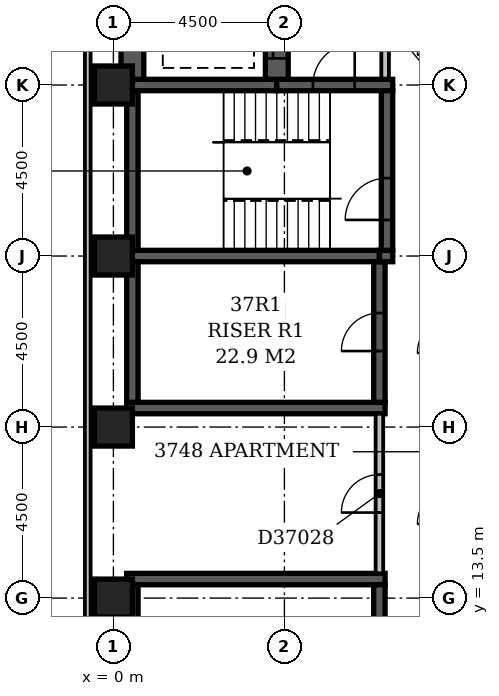
"""IFC4 building model, lengths in metres.
Left out: names, types, materials, properties, quantities, classifications, styles, units other than length and angle.
Written with IfcOpenShell. Run it as: python <this file> out.ifc"""

import sys

from ifc_helpers import new_model, si_unit, direction, frame, frame_2d, origin, origin_2d, place, context, subcontext, project, spatial, rectangle, extrude, element, fill, save


model = new_model("IFC4")
c1 = context("Model", 3, precision=1e-05, world=origin(), true_north=direction((0.0, 1.0)))
c2 = subcontext(c1, "Body", "Model", "MODEL_VIEW")
j1 = project(units=[si_unit("LENGTHUNIT", "METRE"), si_unit("PLANEANGLEUNIT", "RADIAN")], contexts=[c1])
p1 = place(None, origin())
s1 = spatial("IfcSite", under=j1, at=p1, CompositionType="ELEMENT")
p2 = place(p1, origin())
s2 = spatial("IfcBuilding", under=s1, at=p2, CompositionType="ELEMENT")
p3 = place(p2, frame((0.0, 0.0, 148.4)))
s3 = spatial("IfcBuildingStorey", under=s2, at=p3, CompositionType="ELEMENT", Elevation=148.4)
for number, where, z_axis, x_axis in (
    (1, (0.35, 14.0, -0.3), (0.0, 0.0, 1.0), (1.0, 0.0, 0.0)),
    (2, (0.35, 18.5, -0.3), (0.0, 0.0, 1.0), (1.0, 0.0, 0.0)),
):
    element("IfcWall", number, at=place(p3, frame(where, z_axis=z_axis, x_axis=x_axis)), inside=s3, PredefinedType="SHEAR", context=c2, shape_type="SweptSolid", body=[
        extrude(rectangle(XDim=6.8, YDim=0.3, at=frame_2d((3.4, 0.0))), origin(), (0.0, 0.0, 1.0), 3.6),
    ])
p4 = place(p3, frame((0.35, 22.5, -0.3), z_axis=(0.0, 0.0, 1.0), x_axis=(1.0, 0.0, 0.0)))
e3 = element("IfcWall", 3, at=p4, inside=s3, PredefinedType="SHEAR", context=c2, shape_type="SweptSolid", body=[
    extrude(rectangle(XDim=6.65, YDim=0.3, at=frame_2d((3.325, 0.0))), origin(), (0.0, 0.0, 1.0), 3.6),
])
p5 = place(p3, frame((0.35, 27.0, -0.3), z_axis=(0.0, 0.0, 1.0), x_axis=(1.0, 0.0, 0.0)))
e4 = element("IfcWall", 4, at=p5, inside=s3, PredefinedType="SHEAR", context=c2, shape_type="SweptSolid", body=[
    extrude(rectangle(XDim=3.95, YDim=0.3, at=frame_2d((1.975, 0.0))), origin(), (0.0, 0.0, 1.0), 3.6),
])
for number, where, z_axis, x_axis in (
    (5, (0.5, 10.15, -0.3), (0.0, 0.0, 1.0), (0.0, 1.0, 0.0)),
    (6, (0.5, 18.65, -0.3), (0.0, 0.0, 1.0), (0.0, 1.0, 0.0)),
):
    element("IfcWall", number, at=place(p3, frame(where, z_axis=z_axis, x_axis=x_axis)), inside=s3, PredefinedType="SHEAR", context=c2, shape_type="SweptSolid", body=[
        extrude(rectangle(XDim=3.7, YDim=0.3, at=frame_2d((1.85, 0.0))), origin(), (0.0, 0.0, 1.0), 3.6),
    ])
p6 = place(p3, frame((0.5, 22.65, -0.3), z_axis=(0.0, 0.0, 1.0), x_axis=(0.0, 1.0, 0.0)))
e7 = element("IfcWall", 7, at=p6, inside=s3, PredefinedType="SHEAR", context=c2, shape_type="SweptSolid", body=[
    extrude(rectangle(XDim=4.2, YDim=0.3, at=frame_2d((2.1, 0.0))), origin(), (0.0, 0.0, 1.0), 3.6),
])
p7 = place(p3, frame((0.5, 27.15, -0.3), z_axis=(0.0, 0.0, 1.0), x_axis=(0.0, 1.0, 0.0)))
e8 = element("IfcWall", 8, at=p7, inside=s3, PredefinedType="SHEAR", context=c2, shape_type="SweptSolid", body=[
    extrude(rectangle(XDim=22.05, YDim=0.6, at=frame_2d((11.025, 0.0))), origin(), (0.0, 0.0, 1.0), 3.6),
])
p8 = place(p3, frame((4.3, 27.0, -0.3), z_axis=(0.0, 0.0, 1.0), x_axis=(1.0, 0.0, 0.0)))
e9 = element("IfcWall", 9, at=p8, inside=s3, PredefinedType="SHEAR", context=c2, shape_type="SweptSolid", body=[
    extrude(rectangle(XDim=3.05, YDim=0.3, at=frame_2d((1.525, 0.0))), origin(), (0.0, 0.0, 1.0), 3.6),
])
p9 = place(p8, frame((0.95, 0.0, 0.3)))
e10 = element("IfcOpeningElement", 10, at=p9, cuts=e9, PredefinedType="OPENING", context=c2, shape_type="SweptSolid", body=[
    extrude(rectangle(XDim=1.1, YDim=2.1, at=frame_2d((0.55, 1.05))), frame((0.0, 0.162, 0.0), z_axis=(0.0, -1.0, 0.0), x_axis=(1.0, 0.0, 0.0)), (0.0, 0.0, 1.0), 0.324),
])
p10 = place(p3, frame((4.3, 27.15, -0.3), z_axis=(0.0, 0.0, 1.0), x_axis=(0.0, 1.0, 0.0)))
e11 = element("IfcWall", 11, at=p10, inside=s3, PredefinedType="SHEAR", context=c2, shape_type="SweptSolid", body=[
    extrude(rectangle(XDim=22.05, YDim=0.6, at=frame_2d((11.025, 0.0))), origin(), (0.0, 0.0, 1.0), 3.6),
])
p11 = place(p10, frame((3.05, 0.0, 0.3)))
e12 = element("IfcOpeningElement", 12, at=p11, cuts=e11, PredefinedType="OPENING", context=c2, shape_type="SweptSolid", body=[
    extrude(rectangle(XDim=1.1, YDim=2.1, at=frame_2d((0.55, 1.05))), frame((0.0, 0.312, 0.0), z_axis=(0.0, -1.0, 0.0), x_axis=(1.0, 0.0, 0.0)), (0.0, 0.0, 1.0), 0.624),
])
p12 = place(p10, frame((0.55, 0.0, 0.3)))
e13 = element("IfcOpeningElement", 13, at=p12, cuts=e11, PredefinedType="OPENING", context=c2, shape_type="SweptSolid", body=[
    extrude(rectangle(XDim=1.1, YDim=2.1, at=frame_2d((0.55, 1.05))), frame((0.0, 0.312, 0.0), z_axis=(0.0, -1.0, 0.0), x_axis=(1.0, 0.0, 0.0)), (0.0, 0.0, 1.0), 0.624),
])
p13 = place(p10, frame((20.55, 0.0, 0.3)))
e14 = element("IfcOpeningElement", 14, at=p13, cuts=e11, PredefinedType="OPENING", context=c2, shape_type="SweptSolid", body=[
    extrude(rectangle(XDim=1.1, YDim=2.1, at=frame_2d((0.55, 1.05))), frame((0.0, 0.312, 0.0), z_axis=(0.0, -1.0, 0.0), x_axis=(1.0, 0.0, 0.0)), (0.0, 0.0, 1.0), 0.624),
])
p14 = place(p10, frame((18.05, 0.0, 0.3)))
e15 = element("IfcOpeningElement", 15, at=p14, cuts=e11, PredefinedType="OPENING", context=c2, shape_type="SweptSolid", body=[
    extrude(rectangle(XDim=1.1, YDim=2.1, at=frame_2d((0.55, 1.05))), frame((0.0, 0.312, 0.0), z_axis=(0.0, -1.0, 0.0), x_axis=(1.0, 0.0, 0.0)), (0.0, 0.0, 1.0), 0.624),
])
p15 = place(p10, frame((15.55, 0.0, 0.3)))
e16 = element("IfcOpeningElement", 16, at=p15, cuts=e11, PredefinedType="OPENING", context=c2, shape_type="SweptSolid", body=[
    extrude(rectangle(XDim=1.1, YDim=2.1, at=frame_2d((0.55, 1.05))), frame((0.0, 0.312, 0.0), z_axis=(0.0, -1.0, 0.0), x_axis=(1.0, 0.0, 0.0)), (0.0, 0.0, 1.0), 0.624),
])
p16 = place(p10, frame((13.05, 0.0, 0.3)))
e17 = element("IfcOpeningElement", 17, at=p16, cuts=e11, PredefinedType="OPENING", context=c2, shape_type="SweptSolid", body=[
    extrude(rectangle(XDim=1.1, YDim=2.1, at=frame_2d((0.55, 1.05))), frame((0.0, 0.312, 0.0), z_axis=(0.0, -1.0, 0.0), x_axis=(1.0, 0.0, 0.0)), (0.0, 0.0, 1.0), 0.624),
])
p17 = place(p10, frame((10.55, 0.0, 0.3)))
e18 = element("IfcOpeningElement", 18, at=p17, cuts=e11, PredefinedType="OPENING", context=c2, shape_type="SweptSolid", body=[
    extrude(rectangle(XDim=1.1, YDim=2.1, at=frame_2d((0.55, 1.05))), frame((0.0, 0.312, 0.0), z_axis=(0.0, -1.0, 0.0), x_axis=(1.0, 0.0, 0.0)), (0.0, 0.0, 1.0), 0.624),
])
p18 = place(p10, frame((8.05, 0.0, 0.3)))
e19 = element("IfcOpeningElement", 19, at=p18, cuts=e11, PredefinedType="OPENING", context=c2, shape_type="SweptSolid", body=[
    extrude(rectangle(XDim=1.1, YDim=2.1, at=frame_2d((0.55, 1.05))), frame((0.0, 0.312, 0.0), z_axis=(0.0, -1.0, 0.0), x_axis=(1.0, 0.0, 0.0)), (0.0, 0.0, 1.0), 0.624),
])
p19 = place(p10, frame((5.55, 0.0, 0.3)))
e20 = element("IfcOpeningElement", 20, at=p19, cuts=e11, PredefinedType="OPENING", context=c2, shape_type="SweptSolid", body=[
    extrude(rectangle(XDim=1.1, YDim=2.1, at=frame_2d((0.55, 1.05))), frame((0.0, 0.312, 0.0), z_axis=(0.0, -1.0, 0.0), x_axis=(1.0, 0.0, 0.0)), (0.0, 0.0, 1.0), 0.624),
])
p20 = place(p3, frame((7.0, 10.15, -0.3), z_axis=(0.0, 0.0, 1.0), x_axis=(0.0, 1.0, 0.0)))
e21 = element("IfcWall", 21, at=p20, inside=s3, PredefinedType="SHEAR", context=c2, shape_type="SweptSolid", body=[
    extrude(rectangle(XDim=3.7, YDim=0.3, at=frame_2d((1.85, 0.0))), origin(), (0.0, 0.0, 1.0), 3.6),
])
p21 = place(p20, frame((1.35, 0.0, 0.3)))
e22 = element("IfcOpeningElement", 22, at=p21, cuts=e21, PredefinedType="OPENING", context=c2, shape_type="SweptSolid", body=[
    extrude(rectangle(XDim=1.0, YDim=2.1, at=frame_2d((0.5, 1.05))), frame((0.0, 0.162, 0.0), z_axis=(0.0, -1.0, 0.0), x_axis=(1.0, 0.0, 0.0)), (0.0, 0.0, 1.0), 0.324),
])
p22 = place(p3, frame((7.0, 18.65, -0.3), z_axis=(0.0, 0.0, 1.0), x_axis=(0.0, 1.0, 0.0)))
e23 = element("IfcWall", 23, at=p22, inside=s3, PredefinedType="SHEAR", context=c2, shape_type="SweptSolid", body=[
    extrude(rectangle(XDim=3.7, YDim=0.3, at=frame_2d((1.85, 0.0))), origin(), (0.0, 0.0, 1.0), 3.6),
])
p23 = place(p22, frame((1.35, 0.0, 0.3)))
e24 = element("IfcOpeningElement", 24, at=p23, cuts=e23, PredefinedType="OPENING", context=c2, shape_type="SweptSolid", body=[
    extrude(rectangle(XDim=1.0, YDim=2.1, at=frame_2d((0.5, 1.05))), frame((0.0, 0.162, 0.0), z_axis=(0.0, -1.0, 0.0), x_axis=(1.0, 0.0, 0.0)), (0.0, 0.0, 1.0), 0.324),
])
p24 = place(p3, frame((7.0, 22.5, -0.3), z_axis=(0.0, 0.0, 1.0), x_axis=(1.0, 0.0, 0.0)))
e25 = element("IfcWall", 25, at=p24, inside=s3, PredefinedType="SHEAR", context=c2, shape_type="SweptSolid", body=[
    extrude(rectangle(XDim=0.35, YDim=0.3, at=frame_2d((0.175, 0.0))), origin(), (0.0, 0.0, 1.0), 3.6),
])
p25 = place(p3, frame((7.2, 22.65, -0.3), z_axis=(0.0, 0.0, 1.0), x_axis=(0.0, 1.0, 0.0)))
e26 = element("IfcWall", 26, at=p25, inside=s3, PredefinedType="SHEAR", context=c2, shape_type="SweptSolid", body=[
    extrude(rectangle(XDim=4.2, YDim=0.3, at=frame_2d((2.1, 0.0))), origin(), (0.0, 0.0, 1.0), 3.6),
])
p26 = place(p25, frame((0.8, 0.0, 0.3)))
e27 = element("IfcOpeningElement", 27, at=p26, cuts=e26, PredefinedType="OPENING", context=c2, shape_type="SweptSolid", body=[
    extrude(rectangle(XDim=1.1, YDim=2.1, at=frame_2d((0.55, 1.05))), frame((0.0, 0.162, 0.0), z_axis=(0.0, -1.0, 0.0), x_axis=(1.0, 0.0, 0.0)), (0.0, 0.0, 1.0), 0.324),
])
for number, where, z_axis, x_axis in (
    (28, (0.0, 13.5, -0.3), (0.0, 0.0, 1.0), (1.0, 0.0, 0.0)),
    (29, (0.0, 18.0, -0.3), (0.0, 0.0, 1.0), (1.0, 0.0, 0.0)),
    (30, (0.0, 22.5, -0.3), (0.0, 0.0, 1.0), (1.0, 0.0, 0.0)),
    (31, (0.0, 27.0, -0.3), (0.0, 0.0, 1.0), (1.0, 0.0, 0.0)),
):
    element("IfcColumn", number, at=place(p3, frame(where, z_axis=z_axis, x_axis=x_axis)), inside=s3, PredefinedType="COLUMN", context=c2, shape_type="SweptSolid", body=[
        extrude(rectangle(XDim=1.0, YDim=1.0, at=origin_2d()), origin(), (0.0, 0.0, 1.0), 3.6),
    ])
p27 = place(p3, frame((-0.675, 59.1, 0.0), z_axis=(0.0, 0.0, 1.0), x_axis=(0.0, -1.0, 0.0)))
e32 = element("IfcWall", 32, at=p27, inside=s3, PredefinedType="STANDARD", context=c2, shape_type="SweptSolid", body=[
    extrude(rectangle(XDim=55.35, YDim=0.15, at=frame_2d((27.675, 0.0))), origin(), (0.0, 0.0, 1.0), 2.7),
])
p28 = place(p3, frame((7.15, 27.17, 0.0), z_axis=(0.0, 0.0, 1.0), x_axis=(0.0, 1.0, 0.0)))
e33 = element("IfcWall", 33, at=p28, inside=s3, PredefinedType="PARTITIONING", context=c2, shape_type="SweptSolid", body=[
    extrude(rectangle(XDim=4.83, YDim=0.2, at=frame_2d((2.415, 0.0))), origin(), (0.0, 0.0, 1.0), 3.3),
])
p29 = place(p28, frame((1.73, 0.0, 0.0)))
e34 = element("IfcOpeningElement", 34, at=p29, cuts=e33, PredefinedType="OPENING", context=c2, shape_type="SweptSolid", body=[
    extrude(rectangle(XDim=1.2, YDim=2.1, at=frame_2d((0.6, 1.05))), frame((0.0, 0.112, 0.0), z_axis=(0.0, -1.0, 0.0), x_axis=(1.0, 0.0, 0.0)), (0.0, 0.0, 1.0), 0.224),
])
p30 = place(p3, frame((7.0, 14.15, 0.0), z_axis=(0.0, 0.0, 1.0), x_axis=(0.0, 1.0, 0.0)))
e35 = element("IfcWall", 35, at=p30, inside=s3, PredefinedType="PARTITIONING", context=c2, shape_type="SweptSolid", body=[
    extrude(rectangle(XDim=4.2, YDim=0.2, at=frame_2d((2.1, 0.0))), origin(), (0.0, 0.0, 1.0), 3.3),
])
p31 = place(p30, frame((1.6, 0.0, 0.0)))
e36 = element("IfcOpeningElement", 36, at=p31, cuts=e35, PredefinedType="OPENING", context=c2, shape_type="SweptSolid", body=[
    extrude(rectangle(XDim=1.0, YDim=2.1, at=frame_2d((0.5, 1.05))), frame((0.0, 0.112, 0.0), z_axis=(0.0, -1.0, 0.0), x_axis=(1.0, 0.0, 0.0)), (0.0, 0.0, 1.0), 0.224),
])
p32 = place(p12, origin())
e37 = element("IfcDoor", 37, at=p32, inside=s3, OperationType="SLIDING_TO_LEFT", PredefinedType="DOOR", context=c2, shape_type="SweptSolid", body=[
    extrude(rectangle(XDim=1.1, YDim=2.1, at=frame_2d((0.55, 1.05))), frame((0.0, 0.025, 0.0), z_axis=(0.0, -1.0, 0.0), x_axis=(1.0, 0.0, 0.0)), (0.0, 0.0, 1.0), 0.05),
])
fill(e13, e37)
p33 = place(p23, origin())
e38 = element("IfcDoor", 38, at=p33, inside=s3, OperationType="SINGLE_SWING_LEFT", PredefinedType="DOOR", context=c2, shape_type="SweptSolid", body=[
    extrude(rectangle(XDim=1.0, YDim=2.1, at=frame_2d((0.5, 1.05))), frame((0.0, 0.025, 0.0), z_axis=(0.0, -1.0, 0.0), x_axis=(1.0, 0.0, 0.0)), (0.0, 0.0, 1.0), 0.05),
])
fill(e24, e38)
p34 = place(p9, frame((1.1, 0.0, 0.0), z_axis=(0.0, 0.0, 1.0), x_axis=(-1.0, 0.0, 0.0)))
e39 = element("IfcDoor", 39, at=p34, inside=s3, OperationType="SINGLE_SWING_LEFT", PredefinedType="DOOR", context=c2, shape_type="SweptSolid", body=[
    extrude(rectangle(XDim=1.1, YDim=2.1, at=frame_2d((0.55, 1.05))), frame((0.0, 0.025, 0.0), z_axis=(0.0, -1.0, 0.0), x_axis=(1.0, 0.0, 0.0)), (0.0, 0.0, 1.0), 0.05),
])
fill(e10, e39)
p35 = place(p26, origin())
e40 = element("IfcDoor", 40, at=p35, inside=s3, OperationType="SINGLE_SWING_LEFT", PredefinedType="DOOR", context=c2, shape_type="SweptSolid", body=[
    extrude(rectangle(XDim=1.1, YDim=2.1, at=frame_2d((0.55, 1.05))), frame((0.0, 0.025, 0.0), z_axis=(0.0, -1.0, 0.0), x_axis=(1.0, 0.0, 0.0)), (0.0, 0.0, 1.0), 0.05),
])
fill(e27, e40)
p36 = place(p31, origin())
e41 = element("IfcDoor", 41, at=p36, inside=s3, OperationType="SINGLE_SWING_LEFT", PredefinedType="DOOR", context=c2, shape_type="SweptSolid", body=[
    extrude(rectangle(XDim=1.0, YDim=2.1, at=frame_2d((0.5, 1.05))), frame((0.0, 0.025, 0.0), z_axis=(0.0, -1.0, 0.0), x_axis=(1.0, 0.0, 0.0)), (0.0, 0.0, 1.0), 0.05),
])
fill(e36, e41)
save(model, sys.argv[1])
